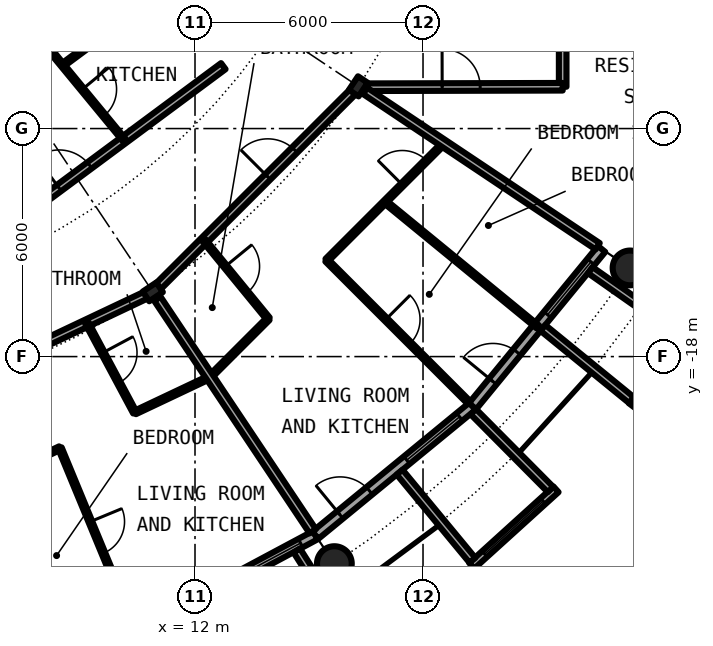
"""IFC4 building model, lengths in metres.
Left out: names, types, materials, properties, quantities, classifications, styles, units other than length and angle.
Written with IfcOpenShell. Run it as: python <this file> out.ifc"""

import sys

from ifc_helpers import new_model, si_unit, direction, frame, frame_2d, origin, origin_2d, place, context, subcontext, project, spatial, rectangle, circle, hollow_circle, i_section, extrude, element, fill, save


model = new_model("IFC4")
c1 = context("Model", 3, precision=1e-05, world=origin(), true_north=direction((0.0, 1.0)))
c2 = subcontext(c1, "Body", "Model", "MODEL_VIEW")
j1 = project(units=[si_unit("LENGTHUNIT", "METRE"), si_unit("PLANEANGLEUNIT", "RADIAN")], contexts=[c1])
p1 = place(None, origin())
s1 = spatial("IfcSite", under=j1, at=p1, CompositionType="ELEMENT")
p2 = place(p1, origin())
s2 = spatial("IfcBuilding", under=s1, at=p2, CompositionType="ELEMENT")
p3 = place(p2, frame((0.0, 0.0, 123.85)))
s3 = spatial("IfcBuildingStorey", under=s2, at=p3, CompositionType="ELEMENT", Elevation=123.85)
for number, where, z_axis, x_axis in (
    (1, (15.667, -23.448, 0.0), (0.0, 0.0, 1.0), (1.0, 0.0, 0.0)),
    (2, (23.448, -15.667, 0.0), (0.0, 0.0, 1.0), (1.0, 0.0, 0.0)),
):
    element("IfcColumn", number, at=place(p3, frame(where, z_axis=z_axis, x_axis=x_axis)), inside=s3, PredefinedType="COLUMN", context=c2, shape_type="SweptSolid", body=[
        extrude(hollow_circle(Radius=0.457, WallThickness=0.04, at=origin_2d()), origin(), (0.0, 0.0, 1.0), 3.05),
    ])
for number, where, z_axis, x_axis in (
    (3, (10.889, -16.297, 0.0), (0.0, 0.0, 1.0), (0.556, -0.831, 0.0)),
    (4, (16.297, -10.889, 0.0), (0.0, 0.0, 1.0), (0.831, -0.556, 0.0)),
):
    element("IfcColumn", number, at=place(p3, frame(where, z_axis=z_axis, x_axis=x_axis)), inside=s3, PredefinedType="COLUMN", context=c2, shape_type="SweptSolid", body=[
        extrude(i_section(OverallWidth=0.307, OverallDepth=0.432, WebThickness=0.021, FlangeThickness=0.04, FilletRadius=0.027, at=origin_2d()), origin(), (0.0, 0.0, 1.0), 3.05),
    ])
p4 = place(p3, frame((10.447, -25.222, 0.0), z_axis=(0.0, 0.0, 1.0), x_axis=(0.881915646801, 0.471407246368, 0.0)))
e5 = element("IfcWall", 5, at=p4, inside=s3, PredefinedType="SOLIDWALL", context=c2, shape_type="SweptSolid", body=[
    extrude(rectangle(XDim=5.352, YDim=0.25, at=frame_2d((2.676, 0.0))), origin(), (0.0, 0.0, 1.0), 2.7),
])
p5 = place(p4, frame((0.841, 0.0, 0.0)))
e6 = element("IfcOpeningElement", 6, at=p5, cuts=e5, PredefinedType="OPENING", context=c2, shape_type="SweptSolid", body=[
    extrude(rectangle(XDim=1.0, YDim=2.2, at=frame_2d((0.5, 1.1))), frame((0.0, 0.135, 0.0), z_axis=(0.0, -1.0, 0.0), x_axis=(1.0, 0.0, 0.0)), (0.0, 0.0, 1.0), 0.27),
])
p6 = place(p4, frame((3.111, 0.0, 0.3)))
e7 = element("IfcOpeningElement", 7, at=p6, cuts=e5, PredefinedType="OPENING", context=c2, shape_type="SweptSolid", body=[
    extrude(rectangle(XDim=1.8, YDim=2.1, at=frame_2d((0.9, 1.05))), frame((0.0, 0.135, 0.0), z_axis=(0.0, -1.0, 0.0), x_axis=(1.0, 0.0, 0.0)), (0.0, 0.0, 1.0), 0.27),
])
p7 = place(p3, frame((14.678, -23.102, -0.03), z_axis=(0.0, 0.0, 1.0), x_axis=(0.536001536573, -0.844217005746, 0.0)))
e8 = element("IfcWall", 8, at=p7, inside=s3, PredefinedType="SOLIDWALL", context=c2, shape_type="SweptSolid", body=[
    extrude(rectangle(XDim=2.929, YDim=0.2, at=frame_2d((1.465, 0.0))), origin(), (0.0, 0.0, 1.0), 2.73),
])
p8 = place(p3, frame((15.167, -22.699, 0.0), z_axis=(0.0, 0.0, 1.0), x_axis=(0.773019449054, 0.634382322723, 0.0)))
e9 = element("IfcWall", 9, at=p8, inside=s3, PredefinedType="SOLIDWALL", context=c2, shape_type="SweptSolid", body=[
    extrude(rectangle(XDim=5.352, YDim=0.25, at=frame_2d((2.676, 0.0))), origin(), (0.0, 0.0, 1.0), 2.7),
])
p9 = place(p8, frame((0.841, 0.0, 0.0)))
e10 = element("IfcOpeningElement", 10, at=p9, cuts=e9, PredefinedType="OPENING", context=c2, shape_type="SweptSolid", body=[
    extrude(rectangle(XDim=1.0, YDim=2.2, at=frame_2d((0.5, 1.1))), frame((0.0, 0.135, 0.0), z_axis=(0.0, -1.0, 0.0), x_axis=(1.0, 0.0, 0.0)), (0.0, 0.0, 1.0), 0.27),
])
p10 = place(p8, frame((3.111, 0.0, 0.3)))
e11 = element("IfcOpeningElement", 11, at=p10, cuts=e9, PredefinedType="OPENING", context=c2, shape_type="SweptSolid", body=[
    extrude(rectangle(XDim=1.8, YDim=2.1, at=frame_2d((0.9, 1.05))), frame((0.0, 0.135, 0.0), z_axis=(0.0, -1.0, 0.0), x_axis=(1.0, 0.0, 0.0)), (0.0, 0.0, 1.0), 0.27),
])
p11 = place(p3, frame((19.282, -23.503, -0.03), z_axis=(0.0, 0.0, 1.0), x_axis=(0.740998365753, 0.671506829416, 0.0)))
e12 = element("IfcWall", 12, at=p11, inside=s3, PredefinedType="SOLIDWALL", context=c2, shape_type="SweptSolid", body=[
    extrude(rectangle(XDim=2.993, YDim=0.2, at=frame_2d((1.497, 0.0))), origin(), (0.0, 0.0, 1.0), 2.73),
])
p12 = place(p11, frame((0.457, 0.0, 0.33)))
e13 = element("IfcOpeningElement", 13, at=p12, cuts=e12, PredefinedType="OPENING", context=c2, shape_type="SweptSolid", body=[
    extrude(circle(Radius=1.04, at=frame_2d((1.04, 1.04))), frame((0.0, 0.11, 0.0), z_axis=(0.0, -1.0, 0.0), x_axis=(1.0, 0.0, 0.0)), (0.0, 0.0, 1.0), 0.22),
])
p13 = place(p3, frame((17.384, -21.041, -0.03), z_axis=(0.0, 0.0, 1.0), x_axis=(0.63709551667, -0.770784861449, 0.0)))
e14 = element("IfcWall", 14, at=p13, inside=s3, PredefinedType="SOLIDWALL", context=c2, shape_type="SweptSolid", body=[
    extrude(rectangle(XDim=3.006, YDim=0.2, at=frame_2d((1.503, 0.0))), origin(), (0.0, 0.0, 1.0), 2.73),
])
p14 = place(p3, frame((19.323, -19.45, -0.03), z_axis=(0.0, 0.0, 1.0), x_axis=(0.704476739375, -0.709727076896, 0.0)))
e15 = element("IfcWall", 15, at=p14, inside=s3, PredefinedType="SOLIDWALL", context=c2, shape_type="SweptSolid", body=[
    extrude(rectangle(XDim=2.883, YDim=0.2, at=frame_2d((1.441, 0.0))), origin(), (0.0, 0.0, 1.0), 2.73),
])
p15 = place(p3, frame((19.304, -19.304, 0.0), z_axis=(0.0, 0.0, 1.0), x_axis=(0.634382322723, 0.773019449054, 0.0)))
e16 = element("IfcWall", 16, at=p15, inside=s3, PredefinedType="SOLIDWALL", context=c2, shape_type="SweptSolid", body=[
    extrude(rectangle(XDim=5.352, YDim=0.25, at=frame_2d((2.676, 0.0))), origin(), (0.0, 0.0, 1.0), 2.7),
])
p16 = place(p15, frame((0.841, 0.0, 0.0)))
e17 = element("IfcOpeningElement", 17, at=p16, cuts=e16, PredefinedType="OPENING", context=c2, shape_type="SweptSolid", body=[
    extrude(rectangle(XDim=1.0, YDim=2.2, at=frame_2d((0.5, 1.1))), frame((0.0, 0.135, 0.0), z_axis=(0.0, -1.0, 0.0), x_axis=(1.0, 0.0, 0.0)), (0.0, 0.0, 1.0), 0.27),
])
p17 = place(p15, frame((3.111, 0.0, 0.3)))
e18 = element("IfcOpeningElement", 18, at=p17, cuts=e16, PredefinedType="OPENING", context=c2, shape_type="SweptSolid", body=[
    extrude(rectangle(XDim=1.8, YDim=2.1, at=frame_2d((0.9, 1.05))), frame((0.0, 0.135, 0.0), z_axis=(0.0, -1.0, 0.0), x_axis=(1.0, 0.0, 0.0)), (0.0, 0.0, 1.0), 0.27),
])
p18 = place(p3, frame((23.497, -19.289, -0.03), z_axis=(0.0, 0.0, 1.0), x_axis=(0.603375996329, 0.797456837111, 0.0)))
e19 = element("IfcWall", 19, at=p18, inside=s3, PredefinedType="SOLIDWALL", context=c2, shape_type="SweptSolid", body=[
    extrude(rectangle(XDim=2.391, YDim=0.2, at=frame_2d((1.196, 0.0))), origin(), (0.0, 0.0, 1.0), 2.73),
])
p19 = place(p18, frame((0.156, 0.0, 0.33)))
e20 = element("IfcOpeningElement", 20, at=p19, cuts=e19, PredefinedType="OPENING", context=c2, shape_type="SweptSolid", body=[
    extrude(circle(Radius=1.04, at=frame_2d((1.04, 1.04))), frame((0.0, 0.11, 0.0), z_axis=(0.0, -1.0, 0.0), x_axis=(1.0, 0.0, 0.0)), (0.0, 0.0, 1.0), 0.22),
])
p20 = place(p3, frame((21.155, -17.246, -0.03), z_axis=(0.0, 0.0, 1.0), x_axis=(0.775179004516, -0.631741648902, 0.0)))
e21 = element("IfcWall", 21, at=p20, inside=s3, PredefinedType="SOLIDWALL", context=c2, shape_type="SweptSolid", body=[
    extrude(rectangle(XDim=3.006, YDim=0.2, at=frame_2d((1.503, 0.0))), origin(), (0.0, 0.0, 1.0), 2.73),
])
p21 = place(p3, frame((22.402, -15.726, -0.03), z_axis=(0.0, 0.0, 1.0), x_axis=(0.818275399393, -0.574826383135, 0.0)))
e22 = element("IfcWall", 22, at=p21, inside=s3, PredefinedType="SOLIDWALL", context=c2, shape_type="SweptSolid", body=[
    extrude(rectangle(XDim=2.929, YDim=0.2, at=frame_2d((1.465, 0.0))), origin(), (0.0, 0.0, 1.0), 2.73),
])
p22 = place(p3, frame((6.473, -21.34, 0.0), z_axis=(0.0, 0.0, 1.0), x_axis=(0.903929143338, 0.427682246328, 0.0)))
e23 = element("IfcWall", 23, at=p22, inside=s3, PredefinedType="PARTITIONING", context=c2, shape_type="SweptSolid", body=[
    extrude(rectangle(XDim=2.182, YDim=0.1, at=frame_2d((1.091, 0.0))), origin(), (0.0, 0.0, 1.0), 2.7),
])
p23 = place(p3, frame((10.425, -19.47, 0.0), z_axis=(0.0, 0.0, 1.0), x_axis=(0.903951937529, 0.427634066274, 0.0)))
e24 = element("IfcWall", 24, at=p23, inside=s3, PredefinedType="PARTITIONING", context=c2, shape_type="SweptSolid", body=[
    extrude(rectangle(XDim=2.181, YDim=0.1, at=frame_2d((1.091, 0.0))), origin(), (0.0, 0.0, 1.0), 2.7),
])
p24 = place(p3, frame((12.389, -18.542, 0.0), z_axis=(0.0, 0.0, 1.0), x_axis=(0.707106781187, 0.707106781187, 0.0)))
e25 = element("IfcWall", 25, at=p24, inside=s3, PredefinedType="PARTITIONING", context=c2, shape_type="SweptSolid", body=[
    extrude(rectangle(XDim=2.175, YDim=0.1, at=frame_2d((1.088, 0.0))), origin(), (0.0, 0.0, 1.0), 2.7),
])
p25 = place(p3, frame((15.468, -15.463, 0.0), z_axis=(0.0, 0.0, 1.0), x_axis=(0.707106781187, 0.707106781187, 0.0)))
e26 = element("IfcWall", 26, at=p25, inside=s3, PredefinedType="PARTITIONING", context=c2, shape_type="SweptSolid", body=[
    extrude(rectangle(XDim=4.351, YDim=0.1, at=frame_2d((2.176, 0.0))), origin(), (0.0, 0.0, 1.0), 2.7),
])
p26 = place(p25, frame((2.808, 0.0, 0.0)))
e27 = element("IfcOpeningElement", 27, at=p26, cuts=e26, PredefinedType="OPENING", context=c2, shape_type="SweptSolid", body=[
    extrude(rectangle(XDim=0.9, YDim=2.3, at=frame_2d((0.45, 1.15))), frame((0.0, 0.06, 0.0), z_axis=(0.0, -1.0, 0.0), x_axis=(1.0, 0.0, 0.0)), (0.0, 0.0, 1.0), 0.12),
])
p27 = place(p3, frame((21.675, -10.9, 0.0), z_axis=(0.0, 0.0, 1.0), x_axis=(0.0, 1.0, 0.0)))
e28 = element("IfcWall", 28, at=p27, inside=s3, PredefinedType="PARTITIONING", context=c2, shape_type="SweptSolid", body=[
    extrude(rectangle(XDim=1.7, YDim=0.2, at=frame_2d((0.85, 0.0))), origin(), (0.0, 0.0, 1.0), 2.7),
])
p28 = place(p3, frame((5.69, -18.756, 0.0), z_axis=(0.0, 0.0, 1.0), x_axis=(0.903968655954, 0.427598724335, 0.0)))
e29 = element("IfcWall", 29, at=p28, inside=s3, PredefinedType="PARTITIONING", context=c2, shape_type="SweptSolid", body=[
    extrude(rectangle(XDim=5.596, YDim=0.2, at=frame_2d((2.798, 0.0))), origin(), (0.0, 0.0, 1.0), 2.39),
])
p29 = place(p28, frame((1.418, 0.0, 0.0)))
e30 = element("IfcOpeningElement", 30, at=p29, cuts=e29, PredefinedType="OPENING", context=c2, shape_type="SweptSolid", body=[
    extrude(rectangle(XDim=1.0, YDim=2.3, at=frame_2d((0.5, 1.15))), frame((0.0, 0.11, 0.0), z_axis=(0.0, -1.0, 0.0), x_axis=(1.0, 0.0, 0.0)), (0.0, 0.0, 1.0), 0.22),
])
p30 = place(p3, frame((11.0, -16.186, 0.0), z_axis=(0.0, 0.0, 1.0), x_axis=(0.707106781187, 0.707106781187, 0.0)))
e31 = element("IfcWall", 31, at=p30, inside=s3, PredefinedType="PARTITIONING", context=c2, shape_type="SweptSolid", body=[
    extrude(rectangle(XDim=7.334, YDim=0.2, at=frame_2d((3.667, 0.0))), origin(), (0.0, 0.0, 1.0), 2.39),
])
p31 = place(p30, frame((4.123, 0.0, 0.0)))
e32 = element("IfcOpeningElement", 32, at=p31, cuts=e31, PredefinedType="OPENING", context=c2, shape_type="SweptSolid", body=[
    extrude(rectangle(XDim=1.0, YDim=2.3, at=frame_2d((0.5, 1.15))), frame((0.0, 0.11, 0.0), z_axis=(0.0, -1.0, 0.0), x_axis=(1.0, 0.0, 0.0)), (0.0, 0.0, 1.0), 0.22),
])
p32 = place(p3, frame((4.906, -16.172, 0.0), z_axis=(0.0, 0.0, 1.0), x_axis=(0.803191461888, 0.595720971219, 0.0)))
e33 = element("IfcWall", 33, at=p32, inside=s3, PredefinedType="PARTITIONING", context=c2, shape_type="SweptSolid", body=[
    extrude(rectangle(XDim=9.76, YDim=0.2, at=frame_2d((4.88, 0.0))), origin(), (0.0, 0.0, 1.0), 2.7),
])
p33 = place(p32, frame((4.38, 0.0, 0.0)))
e34 = element("IfcOpeningElement", 34, at=p33, cuts=e33, PredefinedType="OPENING", context=c2, shape_type="SweptSolid", body=[
    extrude(rectangle(XDim=1.0, YDim=2.3, at=frame_2d((0.5, 1.15))), frame((0.0, 0.11, 0.0), z_axis=(0.0, -1.0, 0.0), x_axis=(1.0, 0.0, 0.0)), (0.0, 0.0, 1.0), 0.22),
])
p34 = place(p3, frame((8.513, -10.332, 0.0), z_axis=(0.0, 0.0, 1.0), x_axis=(0.803149591038, 0.595777420196, 0.0)))
e35 = element("IfcWall", 35, at=p34, inside=s3, PredefinedType="PARTITIONING", context=c2, shape_type="SweptSolid", body=[
    extrude(rectangle(XDim=1.9, YDim=0.1, at=frame_2d((0.95, 0.0))), origin(), (0.0, 0.0, 1.0), 2.7),
])
p35 = place(p3, frame((16.541, -10.912, 0.0), z_axis=(0.0, 0.0, 1.0), x_axis=(0.999997173357, 0.002377662213, 0.0)))
e36 = element("IfcWall", 36, at=p35, inside=s3, PredefinedType="PARTITIONING", context=c2, shape_type="SweptSolid", body=[
    extrude(rectangle(XDim=5.134, YDim=0.2, at=frame_2d((2.567, 0.0))), origin(), (0.0, 0.0, 1.0), 2.7),
])
p36 = place(p35, frame((1.963, 0.0, 0.0)))
e37 = element("IfcOpeningElement", 37, at=p36, cuts=e36, PredefinedType="OPENING", context=c2, shape_type="SweptSolid", body=[
    extrude(rectangle(XDim=1.0, YDim=2.3, at=frame_2d((0.5, 1.15))), frame((0.0, 0.11, 0.0), z_axis=(0.0, -1.0, 0.0), x_axis=(1.0, 0.0, 0.0)), (0.0, 0.0, 1.0), 0.22),
])
p37 = place(p3, frame((4.908, -5.959, 0.0), z_axis=(0.0, 0.0, 1.0), x_axis=(0.636105207978, -0.771602335652, 0.0)))
e38 = element("IfcWall", 38, at=p37, inside=s3, PredefinedType="PARTITIONING", context=c2, shape_type="SweptSolid", body=[
    extrude(rectangle(XDim=8.213, YDim=0.1, at=frame_2d((4.106, 0.0))), origin(), (0.0, 0.0, 1.0), 2.7),
])
p38 = place(p37, frame((6.49, 0.0, 0.0)))
e39 = element("IfcOpeningElement", 39, at=p38, cuts=e38, PredefinedType="OPENING", context=c2, shape_type="SweptSolid", body=[
    extrude(rectangle(XDim=0.9, YDim=2.3, at=frame_2d((0.45, 1.15))), frame((0.0, 0.06, 0.0), z_axis=(0.0, -1.0, 0.0), x_axis=(1.0, 0.0, 0.0)), (0.0, 0.0, 1.0), 0.12),
])
p39 = place(p37, frame((2.384, 0.0, 0.0)))
e40 = element("IfcOpeningElement", 40, at=p39, cuts=e38, PredefinedType="OPENING", context=c2, shape_type="SweptSolid", body=[
    extrude(rectangle(XDim=0.9, YDim=2.3, at=frame_2d((0.45, 1.15))), frame((0.0, 0.06, 0.0), z_axis=(0.0, -1.0, 0.0), x_axis=(1.0, 0.0, 0.0)), (0.0, 0.0, 1.0), 0.12),
])
p40 = place(p3, frame((8.445, -20.407, 0.0), z_axis=(0.0, 0.0, 1.0), x_axis=(0.382339082848, -0.92402209158, 0.0)))
e41 = element("IfcWall", 41, at=p40, inside=s3, PredefinedType="PARTITIONING", context=c2, shape_type="SweptSolid", body=[
    extrude(rectangle(XDim=5.09, YDim=0.1, at=frame_2d((2.545, 0.0))), origin(), (0.0, 0.0, 1.0), 2.7),
])
p41 = place(p40, frame((2.095, 0.0, 0.0)))
e42 = element("IfcOpeningElement", 42, at=p41, cuts=e41, PredefinedType="OPENING", context=c2, shape_type="SweptSolid", body=[
    extrude(rectangle(XDim=0.9, YDim=2.3, at=frame_2d((0.45, 1.15))), frame((0.0, 0.06, 0.0), z_axis=(0.0, -1.0, 0.0), x_axis=(1.0, 0.0, 0.0)), (0.0, 0.0, 1.0), 0.12),
])
p42 = place(p3, frame((9.156, -17.117, 0.0), z_axis=(0.0, 0.0, 1.0), x_axis=(0.471701791767, -0.881758141241, 0.0)))
e43 = element("IfcWall", 43, at=p42, inside=s3, PredefinedType="PARTITIONING", context=c2, shape_type="SweptSolid", body=[
    extrude(rectangle(XDim=2.673, YDim=0.1, at=frame_2d((1.337, 0.0))), origin(), (0.0, 0.0, 1.0), 2.7),
])
p43 = place(p42, frame((0.887, 0.0, 0.0)))
e44 = element("IfcOpeningElement", 44, at=p43, cuts=e43, PredefinedType="OPENING", context=c2, shape_type="SweptSolid", body=[
    extrude(rectangle(XDim=0.9, YDim=2.3, at=frame_2d((0.45, 1.15))), frame((0.0, 0.06, 0.0), z_axis=(0.0, -1.0, 0.0), x_axis=(1.0, 0.0, 0.0)), (0.0, 0.0, 1.0), 0.12),
])
p44 = place(p3, frame((11.009, -16.477, 0.0), z_axis=(0.0, 0.0, 1.0), x_axis=(0.555664536482, -0.831406593008, 0.0)))
e45 = element("IfcWall", 45, at=p44, inside=s3, PredefinedType="PARTITIONING", context=c2, shape_type="SweptSolid", body=[
    extrude(rectangle(XDim=7.358, YDim=0.2, at=frame_2d((3.679, 0.0))), origin(), (0.0, 0.0, 1.0), 2.7),
])
p45 = place(p3, frame((12.241, -14.945, 0.0), z_axis=(0.0, 0.0, 1.0), x_axis=(0.633582447834, -0.77367517848, 0.0)))
e46 = element("IfcWall", 46, at=p45, inside=s3, PredefinedType="PARTITIONING", context=c2, shape_type="SweptSolid", body=[
    extrude(rectangle(XDim=2.661, YDim=0.1, at=frame_2d((1.331, 0.0))), origin(), (0.0, 0.0, 1.0), 2.7),
])
p46 = place(p45, frame((0.881, 0.0, 0.0)))
e47 = element("IfcOpeningElement", 47, at=p46, cuts=e46, PredefinedType="OPENING", context=c2, shape_type="SweptSolid", body=[
    extrude(rectangle(XDim=0.9, YDim=2.3, at=frame_2d((0.45, 1.15))), frame((0.0, 0.06, 0.0), z_axis=(0.0, -1.0, 0.0), x_axis=(1.0, 0.0, 0.0)), (0.0, 0.0, 1.0), 0.12),
])
p47 = place(p3, frame((15.465, -15.465, 0.0), z_axis=(0.0, 0.0, 1.0), x_axis=(0.707106781187, -0.707106781187, 0.0)))
e48 = element("IfcWall", 48, at=p47, inside=s3, PredefinedType="PARTITIONING", context=c2, shape_type="SweptSolid", body=[
    extrude(rectangle(XDim=5.305, YDim=0.1, at=frame_2d((2.652, 0.0))), origin(), (0.0, 0.0, 1.0), 2.7),
])
p48 = place(p47, frame((2.202, 0.0, 0.0)))
e49 = element("IfcOpeningElement", 49, at=p48, cuts=e48, PredefinedType="OPENING", context=c2, shape_type="SweptSolid", body=[
    extrude(rectangle(XDim=0.9, YDim=2.3, at=frame_2d((0.45, 1.15))), frame((0.0, 0.06, 0.0), z_axis=(0.0, -1.0, 0.0), x_axis=(1.0, 0.0, 0.0)), (0.0, 0.0, 1.0), 0.12),
])
p49 = place(p3, frame((16.477, -11.009, 0.0), z_axis=(0.0, 0.0, 1.0), x_axis=(0.831467903109, -0.555572791, 0.0)))
e50 = element("IfcWall", 50, at=p49, inside=s3, PredefinedType="PARTITIONING", context=c2, shape_type="SweptSolid", body=[
    extrude(rectangle(XDim=7.358, YDim=0.2, at=frame_2d((3.679, 0.0))), origin(), (0.0, 0.0, 1.0), 2.7),
])
p50 = place(p3, frame((17.004, -13.927, 0.0), z_axis=(0.0, 0.0, 1.0), x_axis=(0.773517471898, -0.633774976367, 0.0)))
e51 = element("IfcWall", 51, at=p50, inside=s3, PredefinedType="PARTITIONING", context=c2, shape_type="SweptSolid", body=[
    extrude(rectangle(XDim=5.196, YDim=0.1, at=frame_2d((2.598, 0.0))), origin(), (0.0, 0.0, 1.0), 2.7),
])
p51 = place(p6, origin())
e52 = element("IfcWindow", 52, at=p51, inside=s3, PartitioningType="SINGLE_PANEL", PredefinedType="WINDOW", context=c2, shape_type="SweptSolid", body=[
    extrude(rectangle(XDim=1.8, YDim=2.1, at=frame_2d((0.9, 1.05))), frame((0.0, 0.03, 0.0), z_axis=(0.0, -1.0, 0.0), x_axis=(1.0, 0.0, 0.0)), (0.0, 0.0, 1.0), 0.06),
])
fill(e7, e52)
p52 = place(p9, origin())
e53 = element("IfcDoor", 53, at=p52, inside=s3, OperationType="SINGLE_SWING_LEFT", PredefinedType="DOOR", context=c2, shape_type="SweptSolid", body=[
    extrude(rectangle(XDim=1.0, YDim=2.2, at=frame_2d((0.5, 1.1))), frame((0.0, 0.025, 0.0), z_axis=(0.0, -1.0, 0.0), x_axis=(1.0, 0.0, 0.0)), (0.0, 0.0, 1.0), 0.05),
])
fill(e10, e53)
p53 = place(p10, origin())
e54 = element("IfcWindow", 54, at=p53, inside=s3, PartitioningType="SINGLE_PANEL", PredefinedType="WINDOW", context=c2, shape_type="SweptSolid", body=[
    extrude(rectangle(XDim=1.8, YDim=2.1, at=frame_2d((0.9, 1.05))), frame((0.0, 0.03, 0.0), z_axis=(0.0, -1.0, 0.0), x_axis=(1.0, 0.0, 0.0)), (0.0, 0.0, 1.0), 0.06),
])
fill(e11, e54)
p54 = place(p12, origin())
e55 = element("IfcWindow", 55, at=p54, inside=s3, PartitioningType="SINGLE_PANEL", PredefinedType="WINDOW", context=c2, shape_type="SweptSolid", body=[
    extrude(circle(Radius=1.04, at=frame_2d((1.04, 1.04))), frame((0.0, 0.03, 0.0), z_axis=(0.0, -1.0, 0.0), x_axis=(1.0, 0.0, 0.0)), (0.0, 0.0, 1.0), 0.06),
])
fill(e13, e55)
p55 = place(p16, origin())
e56 = element("IfcDoor", 56, at=p55, inside=s3, OperationType="SINGLE_SWING_LEFT", PredefinedType="DOOR", context=c2, shape_type="SweptSolid", body=[
    extrude(rectangle(XDim=1.0, YDim=2.2, at=frame_2d((0.5, 1.1))), frame((0.0, 0.025, 0.0), z_axis=(0.0, -1.0, 0.0), x_axis=(1.0, 0.0, 0.0)), (0.0, 0.0, 1.0), 0.05),
])
fill(e17, e56)
p56 = place(p17, origin())
e57 = element("IfcWindow", 57, at=p56, inside=s3, PartitioningType="SINGLE_PANEL", PredefinedType="WINDOW", context=c2, shape_type="SweptSolid", body=[
    extrude(rectangle(XDim=1.8, YDim=2.1, at=frame_2d((0.9, 1.05))), frame((0.0, 0.03, 0.0), z_axis=(0.0, -1.0, 0.0), x_axis=(1.0, 0.0, 0.0)), (0.0, 0.0, 1.0), 0.06),
])
fill(e18, e57)
p57 = place(p43, origin())
e58 = element("IfcDoor", 58, at=p57, inside=s3, OperationType="SINGLE_SWING_LEFT", PredefinedType="DOOR", context=c2, shape_type="SweptSolid", body=[
    extrude(rectangle(XDim=0.9, YDim=2.3, at=frame_2d((0.45, 1.15))), frame((0.0, 0.025, 0.0), z_axis=(0.0, -1.0, 0.0), x_axis=(1.0, 0.0, 0.0)), (0.0, 0.0, 1.0), 0.05),
])
fill(e44, e58)
p58 = place(p41, origin())
e59 = element("IfcDoor", 59, at=p58, inside=s3, OperationType="SINGLE_SWING_LEFT", PredefinedType="DOOR", context=c2, shape_type="SweptSolid", body=[
    extrude(rectangle(XDim=0.9, YDim=2.3, at=frame_2d((0.45, 1.15))), frame((0.0, 0.025, 0.0), z_axis=(0.0, -1.0, 0.0), x_axis=(1.0, 0.0, 0.0)), (0.0, 0.0, 1.0), 0.05),
])
fill(e42, e59)
p59 = place(p31, origin())
e60 = element("IfcDoor", 60, at=p59, inside=s3, OperationType="SINGLE_SWING_RIGHT", PredefinedType="DOOR", context=c2, shape_type="SweptSolid", body=[
    extrude(rectangle(XDim=1.0, YDim=2.3, at=frame_2d((0.5, 1.15))), frame((0.0, 0.025, 0.0), z_axis=(0.0, -1.0, 0.0), x_axis=(1.0, 0.0, 0.0)), (0.0, 0.0, 1.0), 0.05),
])
fill(e32, e60)
p60 = place(p46, origin())
e61 = element("IfcDoor", 61, at=p60, inside=s3, OperationType="SINGLE_SWING_LEFT", PredefinedType="DOOR", context=c2, shape_type="SweptSolid", body=[
    extrude(rectangle(XDim=0.9, YDim=2.3, at=frame_2d((0.45, 1.15))), frame((0.0, 0.025, 0.0), z_axis=(0.0, -1.0, 0.0), x_axis=(1.0, 0.0, 0.0)), (0.0, 0.0, 1.0), 0.05),
])
fill(e47, e61)
p61 = place(p48, origin())
e62 = element("IfcDoor", 62, at=p61, inside=s3, OperationType="SINGLE_SWING_RIGHT", PredefinedType="DOOR", context=c2, shape_type="SweptSolid", body=[
    extrude(rectangle(XDim=0.9, YDim=2.3, at=frame_2d((0.45, 1.15))), frame((0.0, 0.025, 0.0), z_axis=(0.0, -1.0, 0.0), x_axis=(1.0, 0.0, 0.0)), (0.0, 0.0, 1.0), 0.05),
])
fill(e49, e62)
p62 = place(p26, origin())
e63 = element("IfcDoor", 63, at=p62, inside=s3, OperationType="SINGLE_SWING_RIGHT", PredefinedType="DOOR", context=c2, shape_type="SweptSolid", body=[
    extrude(rectangle(XDim=0.9, YDim=2.3, at=frame_2d((0.45, 1.15))), frame((0.0, 0.025, 0.0), z_axis=(0.0, -1.0, 0.0), x_axis=(1.0, 0.0, 0.0)), (0.0, 0.0, 1.0), 0.05),
])
fill(e27, e63)
p63 = place(p33, origin())
e64 = element("IfcDoor", 64, at=p63, inside=s3, OperationType="SINGLE_SWING_LEFT", PredefinedType="DOOR", context=c2, shape_type="SweptSolid", body=[
    extrude(rectangle(XDim=1.0, YDim=2.3, at=frame_2d((0.5, 1.15))), frame((0.0, 0.025, 0.0), z_axis=(0.0, -1.0, 0.0), x_axis=(1.0, 0.0, 0.0)), (0.0, 0.0, 1.0), 0.05),
])
fill(e34, e64)
p64 = place(p38, origin())
e65 = element("IfcDoor", 65, at=p64, inside=s3, OperationType="SINGLE_SWING_RIGHT", PredefinedType="DOOR", context=c2, shape_type="SweptSolid", body=[
    extrude(rectangle(XDim=0.9, YDim=2.3, at=frame_2d((0.45, 1.15))), frame((0.0, 0.025, 0.0), z_axis=(0.0, -1.0, 0.0), x_axis=(1.0, 0.0, 0.0)), (0.0, 0.0, 1.0), 0.05),
])
fill(e39, e65)
p65 = place(p36, origin())
e66 = element("IfcDoor", 66, at=p65, inside=s3, OperationType="SINGLE_SWING_LEFT", PredefinedType="DOOR", context=c2, shape_type="SweptSolid", body=[
    extrude(rectangle(XDim=1.0, YDim=2.3, at=frame_2d((0.5, 1.15))), frame((0.0, 0.025, 0.0), z_axis=(0.0, -1.0, 0.0), x_axis=(1.0, 0.0, 0.0)), (0.0, 0.0, 1.0), 0.05),
])
fill(e37, e66)
save(model, sys.argv[1])
